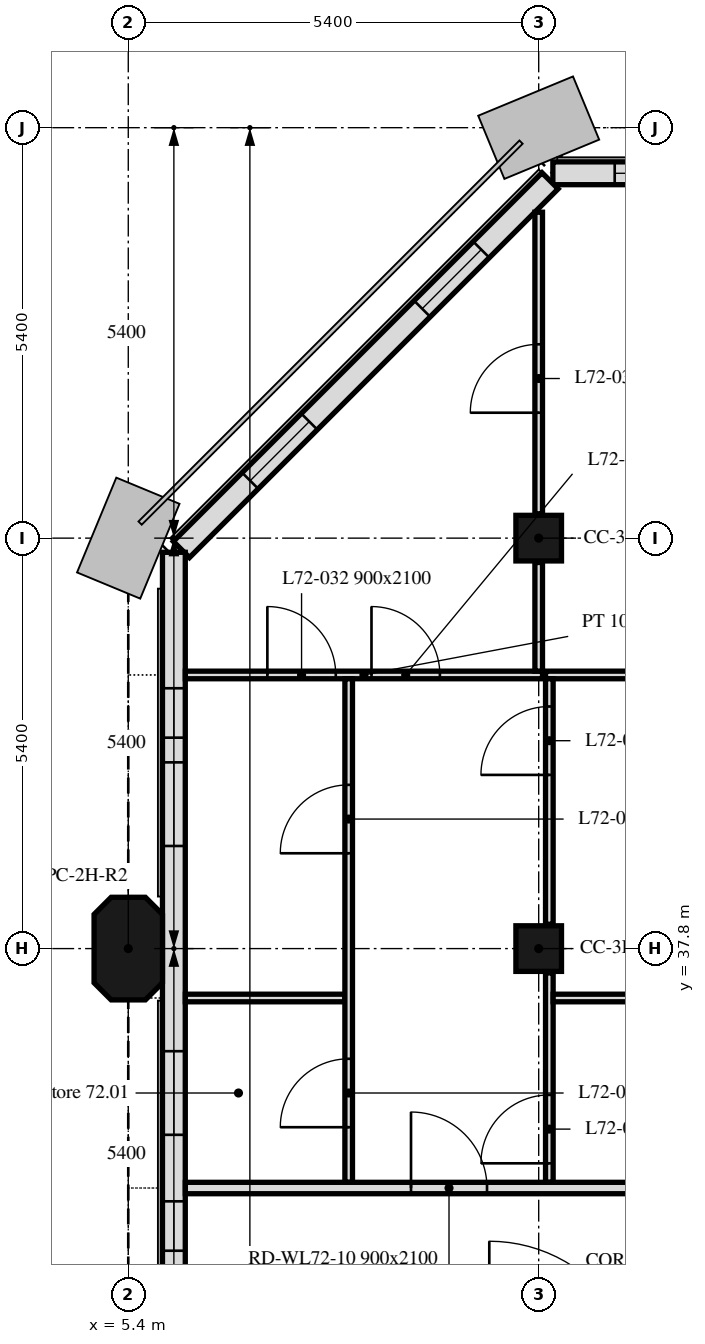
"""IFC4 building model, lengths in metres.
Left out: names, types, materials, properties, quantities, classifications, styles, units other than length and angle.
Written with IfcOpenShell. Run it as: python <this file> out.ifc"""

import sys

from ifc_helpers import new_model, si_unit, direction, frame, frame_2d, origin, origin_2d, place, context, subcontext, project, spatial, polyline, rectangle, outline, extrude, element, fill, save


model = new_model("IFC4")
c1 = context("Model", 3, precision=1e-05, world=origin(), true_north=direction((0.0, 1.0)))
c2 = subcontext(c1, "Body", "Model", "MODEL_VIEW")
j1 = project(units=[si_unit("LENGTHUNIT", "METRE"), si_unit("PLANEANGLEUNIT", "RADIAN")], contexts=[c1])
p1 = place(None, origin())
s1 = spatial("IfcSite", under=j1, at=p1, CompositionType="ELEMENT")
p2 = place(p1, origin())
s2 = spatial("IfcBuilding", under=s1, at=p2, CompositionType="ELEMENT")
p3 = place(p2, frame((0.0, 0.0, 291.7)))
s3 = spatial("IfcBuildingStorey", under=s2, at=p3, CompositionType="ELEMENT", Elevation=291.7)
p4 = place(p3, frame((5.4, 37.8, 0.0), z_axis=(0.0, 0.0, 1.0), x_axis=(0.0, 1.0, 0.0)))
e1 = element("IfcColumn", 1, at=p4, inside=s3, PredefinedType="COLUMN", context=c2, shape_type="SweptSolid", body=[
    extrude(outline(polyline([(-0.45, -0.45), (0.45, -0.45), (0.675, -0.225), (0.675, 0.225), (0.45, 0.45), (-0.45, 0.45), (-0.675, 0.225), (-0.675, -0.225), (-0.45, -0.45)])), origin(), (0.0, 0.0, 1.0), 3.0),
])
for number, where, z_axis, x_axis in (
    (2, (10.8, 37.8, 0.0), (0.0, 0.0, 1.0), (1.0, 0.0, 0.0)),
    (3, (10.8, 43.2, 0.0), (0.0, 0.0, 1.0), (1.0, 0.0, 0.0)),
):
    element("IfcColumn", number, at=place(p3, frame(where, z_axis=z_axis, x_axis=x_axis)), inside=s3, PredefinedType="COLUMN", context=c2, shape_type="SweptSolid", body=[
        extrude(rectangle(XDim=0.6, YDim=0.6, at=origin_2d()), origin(), (0.0, 0.0, 1.0), 3.0),
    ])
p5 = place(p3, frame((43.014, 48.0, 0.0), z_axis=(0.0, 0.0, 1.0), x_axis=(-1.0, 0.0, 0.0)))
e4 = element("IfcWall", 4, at=p5, inside=s3, PredefinedType="SOLIDWALL", context=c2, shape_type="SweptSolid", body=[
    extrude(rectangle(XDim=32.027, YDim=0.3, at=frame_2d((16.014, 0.0))), origin(), (0.0, 0.0, 1.0), 3.0),
])
p6 = place(p5, frame((2.764, 0.0, 0.9)))
e5 = element("IfcOpeningElement", 5, at=p6, cuts=e4, PredefinedType="OPENING", context=c2, shape_type="SweptSolid", body=[
    extrude(rectangle(XDim=1.1, YDim=1.7, at=frame_2d((0.55, 0.85))), frame((0.0, 0.16, 0.0), z_axis=(0.0, -1.0, 0.0), x_axis=(1.0, 0.0, 0.0)), (0.0, 0.0, 1.0), 0.32),
])
p7 = place(p5, frame((6.214, 0.0, 0.9)))
e6 = element("IfcOpeningElement", 6, at=p7, cuts=e4, PredefinedType="OPENING", context=c2, shape_type="SweptSolid", body=[
    extrude(rectangle(XDim=3.4, YDim=1.7, at=frame_2d((1.7, 0.85))), frame((0.0, 0.16, 0.0), z_axis=(0.0, -1.0, 0.0), x_axis=(1.0, 0.0, 0.0)), (0.0, 0.0, 1.0), 0.32),
])
p8 = place(p5, frame((13.564, 0.0, 0.9)))
e7 = element("IfcOpeningElement", 7, at=p8, cuts=e4, PredefinedType="OPENING", context=c2, shape_type="SweptSolid", body=[
    extrude(rectangle(XDim=1.1, YDim=1.7, at=frame_2d((0.55, 0.85))), frame((0.0, 0.16, 0.0), z_axis=(0.0, -1.0, 0.0), x_axis=(1.0, 0.0, 0.0)), (0.0, 0.0, 1.0), 0.32),
])
p9 = place(p5, frame((17.014, 0.0, 0.9)))
e8 = element("IfcOpeningElement", 8, at=p9, cuts=e4, PredefinedType="OPENING", context=c2, shape_type="SweptSolid", body=[
    extrude(rectangle(XDim=3.4, YDim=1.7, at=frame_2d((1.7, 0.85))), frame((0.0, 0.16, 0.0), z_axis=(0.0, -1.0, 0.0), x_axis=(1.0, 0.0, 0.0)), (0.0, 0.0, 1.0), 0.32),
])
p10 = place(p5, frame((24.364, 0.0, 0.9)))
e9 = element("IfcOpeningElement", 9, at=p10, cuts=e4, PredefinedType="OPENING", context=c2, shape_type="SweptSolid", body=[
    extrude(rectangle(XDim=1.1, YDim=1.7, at=frame_2d((0.55, 0.85))), frame((0.0, 0.16, 0.0), z_axis=(0.0, -1.0, 0.0), x_axis=(1.0, 0.0, 0.0)), (0.0, 0.0, 1.0), 0.32),
])
p11 = place(p5, frame((27.814, 0.0, 0.9)))
e10 = element("IfcOpeningElement", 10, at=p11, cuts=e4, PredefinedType="OPENING", context=c2, shape_type="SweptSolid", body=[
    extrude(rectangle(XDim=3.4, YDim=1.7, at=frame_2d((1.7, 0.85))), frame((0.0, 0.16, 0.0), z_axis=(0.0, -1.0, 0.0), x_axis=(1.0, 0.0, 0.0)), (0.0, 0.0, 1.0), 0.32),
])
p12 = place(p3, frame((10.949, 47.901, 0.0), z_axis=(0.0, 0.0, 1.0), x_axis=(-0.707106781187, -0.707106781187, 0.0)))
e11 = element("IfcWall", 11, at=p12, inside=s3, PredefinedType="SOLIDWALL", context=c2, shape_type="SweptSolid", body=[
    extrude(rectangle(XDim=6.86, YDim=0.3, at=frame_2d((3.43, 0.0))), origin(), (0.0, 0.0, 1.0), 3.0),
])
p13 = place(p12, frame((1.28, 0.0, 0.9)))
e12 = element("IfcOpeningElement", 12, at=p13, cuts=e11, PredefinedType="OPENING", context=c2, shape_type="SweptSolid", body=[
    extrude(rectangle(XDim=1.1, YDim=1.7, at=frame_2d((0.55, 0.85))), frame((0.0, 0.16, 0.0), z_axis=(0.0, -1.0, 0.0), x_axis=(1.0, 0.0, 0.0)), (0.0, 0.0, 1.0), 0.32),
])
p14 = place(p12, frame((4.48, 0.0, 0.9)))
e13 = element("IfcOpeningElement", 13, at=p14, cuts=e11, PredefinedType="OPENING", context=c2, shape_type="SweptSolid", body=[
    extrude(rectangle(XDim=1.1, YDim=1.7, at=frame_2d((0.55, 0.85))), frame((0.0, 0.16, 0.0), z_axis=(0.0, -1.0, 0.0), x_axis=(1.0, 0.0, 0.0)), (0.0, 0.0, 1.0), 0.32),
])
p15 = place(p3, frame((6.0, 43.014, 0.0), z_axis=(0.0, 0.0, 1.0), x_axis=(0.0, -1.0, 0.0)))
e14 = element("IfcWall", 14, at=p15, inside=s3, PredefinedType="SOLIDWALL", context=c2, shape_type="SweptSolid", body=[
    extrude(rectangle(XDim=10.614, YDim=0.3, at=frame_2d((5.307, 0.0))), origin(), (0.0, 0.0, 1.0), 3.0),
])
p16 = place(p15, frame((1.789, 0.0, 0.9)))
e15 = element("IfcOpeningElement", 15, at=p16, cuts=e14, PredefinedType="OPENING", context=c2, shape_type="SweptSolid", body=[
    extrude(rectangle(XDim=0.65, YDim=1.7, at=frame_2d((0.325, 0.85))), frame((0.0, 0.16, 0.0), z_axis=(0.0, -1.0, 0.0), x_axis=(1.0, 0.0, 0.0)), (0.0, 0.0, 1.0), 0.32),
])
p17 = place(p15, frame((2.764, 0.0, 0.9)))
e16 = element("IfcOpeningElement", 16, at=p17, cuts=e14, PredefinedType="OPENING", context=c2, shape_type="SweptSolid", body=[
    extrude(rectangle(XDim=1.1, YDim=1.7, at=frame_2d((0.55, 0.85))), frame((0.0, 0.16, 0.0), z_axis=(0.0, -1.0, 0.0), x_axis=(1.0, 0.0, 0.0)), (0.0, 0.0, 1.0), 0.32),
])
p18 = place(p15, frame((6.564, 0.0, 0.9)))
e17 = element("IfcOpeningElement", 17, at=p18, cuts=e14, PredefinedType="OPENING", context=c2, shape_type="SweptSolid", body=[
    extrude(rectangle(XDim=1.1, YDim=1.7, at=frame_2d((0.55, 0.85))), frame((0.0, 0.16, 0.0), z_axis=(0.0, -1.0, 0.0), x_axis=(1.0, 0.0, 0.0)), (0.0, 0.0, 1.0), 0.32),
])
p19 = place(p15, frame((8.539, 0.0, 0.9)))
e18 = element("IfcOpeningElement", 18, at=p19, cuts=e14, PredefinedType="OPENING", context=c2, shape_type="SweptSolid", body=[
    extrude(rectangle(XDim=0.65, YDim=1.7, at=frame_2d((0.325, 0.85))), frame((0.0, 0.16, 0.0), z_axis=(0.0, -1.0, 0.0), x_axis=(1.0, 0.0, 0.0)), (0.0, 0.0, 1.0), 0.32),
])
p20 = place(p3, frame((6.151, 41.4, 0.0), z_axis=(0.0, 0.0, 1.0), x_axis=(1.0, 0.0, 0.0)))
e19 = element("IfcWall", 19, at=p20, inside=s3, PredefinedType="PARTITIONING", context=c2, shape_type="SweptSolid", body=[
    extrude(rectangle(XDim=4.699, YDim=0.1, at=frame_2d((2.35, 0.0))), origin(), (0.0, 0.0, 1.0), 3.0),
])
p21 = place(p20, frame((1.079, 0.0, 0.0)))
e20 = element("IfcOpeningElement", 20, at=p21, cuts=e19, PredefinedType="OPENING", context=c2, shape_type="SweptSolid", body=[
    extrude(rectangle(XDim=0.9, YDim=2.1, at=frame_2d((0.45, 1.05))), frame((0.0, 0.05, 0.0), z_axis=(0.0, -1.0, 0.0), x_axis=(1.0, 0.0, 0.0)), (0.0, 0.0, 1.0), 0.1),
])
p22 = place(p20, frame((2.449, 0.0, 0.0)))
e21 = element("IfcOpeningElement", 21, at=p22, cuts=e19, PredefinedType="OPENING", context=c2, shape_type="SweptSolid", body=[
    extrude(rectangle(XDim=0.9, YDim=2.1, at=frame_2d((0.45, 1.05))), frame((0.0, 0.05, 0.0), z_axis=(0.0, -1.0, 0.0), x_axis=(1.0, 0.0, 0.0)), (0.0, 0.0, 1.0), 0.1),
])
p23 = place(p3, frame((10.8, 41.45, 0.0), z_axis=(0.0, 0.0, 1.0), x_axis=(0.0, 1.0, 0.0)))
e22 = element("IfcWall", 22, at=p23, inside=s3, PredefinedType="PARTITIONING", context=c2, shape_type="SweptSolid", body=[
    extrude(rectangle(XDim=1.43, YDim=0.1, at=frame_2d((0.715, 0.0))), origin(), (0.0, 0.0, 1.0), 3.0),
])
p24 = place(p3, frame((10.8, 43.52, 0.0), z_axis=(0.0, 0.0, 1.0), x_axis=(0.0, 1.0, 0.0)))
e23 = element("IfcWall", 23, at=p24, inside=s3, PredefinedType="PARTITIONING", context=c2, shape_type="SweptSolid", body=[
    extrude(rectangle(XDim=3.968, YDim=0.1, at=frame_2d((1.984, 0.0))), origin(), (0.0, 0.0, 1.0), 3.0),
])
p25 = place(p24, frame((1.33, 0.0, 0.0)))
e24 = element("IfcOpeningElement", 24, at=p25, cuts=e23, PredefinedType="OPENING", context=c2, shape_type="SweptSolid", body=[
    extrude(rectangle(XDim=0.9, YDim=2.1, at=frame_2d((0.45, 1.05))), frame((0.0, 0.05, 0.0), z_axis=(0.0, -1.0, 0.0), x_axis=(1.0, 0.0, 0.0)), (0.0, 0.0, 1.0), 0.1),
])
p26 = place(p3, frame((10.89, 41.4, 0.0), z_axis=(0.0, 0.0, 1.0), x_axis=(1.0, 0.0, 0.0)))
e25 = element("IfcWall", 25, at=p26, inside=s3, PredefinedType="PARTITIONING", context=c2, shape_type="SweptSolid", body=[
    extrude(rectangle(XDim=5.235, YDim=0.1, at=frame_2d((2.618, 0.0))), origin(), (0.0, 0.0, 1.0), 3.0),
])
p27 = place(p26, frame((3.15, 0.0, 0.0)))
e26 = element("IfcOpeningElement", 26, at=p27, cuts=e25, PredefinedType="OPENING", context=c2, shape_type="SweptSolid", body=[
    extrude(rectangle(XDim=0.9, YDim=2.1, at=frame_2d((0.45, 1.05))), frame((0.0, 0.05, 0.0), z_axis=(0.0, -1.0, 0.0), x_axis=(1.0, 0.0, 0.0)), (0.0, 0.0, 1.0), 0.1),
])
p28 = place(p3, frame((6.151, 37.15, 0.0), z_axis=(0.0, 0.0, 1.0), x_axis=(1.0, 0.0, 0.0)))
e27 = element("IfcWall", 27, at=p28, inside=s3, PredefinedType="PARTITIONING", context=c2, shape_type="SweptSolid", body=[
    extrude(rectangle(XDim=2.099, YDim=0.1, at=frame_2d((1.05, 0.0))), origin(), (0.0, 0.0, 1.0), 3.0),
])
p29 = place(p3, frame((8.3, 34.725, 0.0), z_axis=(0.0, 0.0, 1.0), x_axis=(0.0, 1.0, 0.0)))
e28 = element("IfcWall", 28, at=p29, inside=s3, PredefinedType="PARTITIONING", context=c2, shape_type="SweptSolid", body=[
    extrude(rectangle(XDim=6.625, YDim=0.1, at=frame_2d((3.312, 0.0))), origin(), (0.0, 0.0, 1.0), 3.0),
])
p30 = place(p29, frame((0.725, 0.0, 0.0)))
e29 = element("IfcOpeningElement", 29, at=p30, cuts=e28, PredefinedType="OPENING", context=c2, shape_type="SweptSolid", body=[
    extrude(rectangle(XDim=0.9, YDim=2.1, at=frame_2d((0.45, 1.05))), frame((0.0, 0.05, 0.0), z_axis=(0.0, -1.0, 0.0), x_axis=(1.0, 0.0, 0.0)), (0.0, 0.0, 1.0), 0.1),
])
p31 = place(p29, frame((4.329, 0.0, 0.0)))
e30 = element("IfcOpeningElement", 30, at=p31, cuts=e28, PredefinedType="OPENING", context=c2, shape_type="SweptSolid", body=[
    extrude(rectangle(XDim=0.9, YDim=2.1, at=frame_2d((0.45, 1.05))), frame((0.0, 0.05, 0.0), z_axis=(0.0, -1.0, 0.0), x_axis=(1.0, 0.0, 0.0)), (0.0, 0.0, 1.0), 0.1),
])
p32 = place(p3, frame((10.94, 34.725, 0.0), z_axis=(0.0, 0.0, 1.0), x_axis=(0.0, 1.0, 0.0)))
e31 = element("IfcWall", 31, at=p32, inside=s3, PredefinedType="PARTITIONING", context=c2, shape_type="SweptSolid", body=[
    extrude(rectangle(XDim=2.755, YDim=0.1, at=frame_2d((1.377, 0.0))), origin(), (0.0, 0.0, 1.0), 3.0),
])
p33 = place(p32, frame((0.25, 0.0, 0.0)))
e32 = element("IfcOpeningElement", 32, at=p33, cuts=e31, PredefinedType="OPENING", context=c2, shape_type="SweptSolid", body=[
    extrude(rectangle(XDim=0.9, YDim=2.1, at=frame_2d((0.45, 1.05))), frame((0.0, 0.05, 0.0), z_axis=(0.0, -1.0, 0.0), x_axis=(1.0, 0.0, 0.0)), (0.0, 0.0, 1.0), 0.1),
])
p34 = place(p3, frame((10.94, 38.12, 0.0), z_axis=(0.0, 0.0, 1.0), x_axis=(0.0, 1.0, 0.0)))
e33 = element("IfcWall", 33, at=p34, inside=s3, PredefinedType="PARTITIONING", context=c2, shape_type="SweptSolid", body=[
    extrude(rectangle(XDim=3.23, YDim=0.1, at=frame_2d((1.615, 0.0))), origin(), (0.0, 0.0, 1.0), 3.0),
])
p35 = place(p34, frame((1.965, 0.0, 0.0)))
e34 = element("IfcOpeningElement", 34, at=p35, cuts=e33, PredefinedType="OPENING", context=c2, shape_type="SweptSolid", body=[
    extrude(rectangle(XDim=0.9, YDim=2.1, at=frame_2d((0.45, 1.05))), frame((0.0, 0.05, 0.0), z_axis=(0.0, -1.0, 0.0), x_axis=(1.0, 0.0, 0.0)), (0.0, 0.0, 1.0), 0.1),
])
p36 = place(p3, frame((10.99, 37.15, 0.0), z_axis=(0.0, 0.0, 1.0), x_axis=(1.0, 0.0, 0.0)))
e35 = element("IfcWall", 35, at=p36, inside=s3, PredefinedType="PARTITIONING", context=c2, shape_type="SweptSolid", body=[
    extrude(rectangle(XDim=5.135, YDim=0.1, at=frame_2d((2.567, 0.0))), origin(), (0.0, 0.0, 1.0), 3.0),
])
p37 = place(p36, frame((3.12, 0.0, 0.0)))
e36 = element("IfcOpeningElement", 36, at=p37, cuts=e35, PredefinedType="OPENING", context=c2, shape_type="SweptSolid", body=[
    extrude(rectangle(XDim=0.9, YDim=2.1, at=frame_2d((0.45, 1.05))), frame((0.0, 0.05, 0.0), z_axis=(0.0, -1.0, 0.0), x_axis=(1.0, 0.0, 0.0)), (0.0, 0.0, 1.0), 0.1),
])
p38 = place(p3, frame((6.151, 34.65, 0.0), z_axis=(0.0, 0.0, 1.0), x_axis=(1.0, 0.0, 0.0)))
e37 = element("IfcWall", 37, at=p38, inside=s3, PredefinedType="PARTITIONING", context=c2, shape_type="SweptSolid", body=[
    extrude(rectangle(XDim=41.698, YDim=0.15, at=frame_2d((20.849, 0.0))), origin(), (0.0, 0.0, 1.0), 2.4),
])
p39 = place(p38, frame((2.969, 0.0, 0.0)))
e38 = element("IfcOpeningElement", 38, at=p39, cuts=e37, PredefinedType="OPENING", context=c2, shape_type="SweptSolid", body=[
    extrude(rectangle(XDim=1.0, YDim=2.1, at=frame_2d((0.5, 1.05))), frame((0.0, 0.075, 0.0), z_axis=(0.0, -1.0, 0.0), x_axis=(1.0, 0.0, 0.0)), (0.0, 0.0, 1.0), 0.15),
])
p40 = place(p38, frame((12.944, 0.0, 0.0)))
e39 = element("IfcOpeningElement", 39, at=p40, cuts=e37, PredefinedType="OPENING", context=c2, shape_type="SweptSolid", body=[
    extrude(rectangle(XDim=1.0, YDim=2.1, at=frame_2d((0.5, 1.05))), frame((0.0, 0.075, 0.0), z_axis=(0.0, -1.0, 0.0), x_axis=(1.0, 0.0, 0.0)), (0.0, 0.0, 1.0), 0.15),
])
p41 = place(p38, frame((24.444, 0.0, 0.0)))
e40 = element("IfcOpeningElement", 40, at=p41, cuts=e37, PredefinedType="OPENING", context=c2, shape_type="SweptSolid", body=[
    extrude(rectangle(XDim=1.0, YDim=2.1, at=frame_2d((0.5, 1.05))), frame((0.0, 0.075, 0.0), z_axis=(0.0, -1.0, 0.0), x_axis=(1.0, 0.0, 0.0)), (0.0, 0.0, 1.0), 0.15),
])
p42 = place(p38, frame((34.964, 0.0, 0.0)))
e41 = element("IfcOpeningElement", 41, at=p42, cuts=e37, PredefinedType="OPENING", context=c2, shape_type="SweptSolid", body=[
    extrude(rectangle(XDim=1.0, YDim=2.1, at=frame_2d((0.5, 1.05))), frame((0.0, 0.075, 0.0), z_axis=(0.0, -1.0, 0.0), x_axis=(1.0, 0.0, 0.0)), (0.0, 0.0, 1.0), 0.15),
])
p43 = place(p11, origin())
e42 = element("IfcWindow", 42, at=p43, inside=s3, PartitioningType="SINGLE_PANEL", PredefinedType="WINDOW", context=c2, shape_type="SweptSolid", body=[
    extrude(rectangle(XDim=3.4, YDim=1.7, at=frame_2d((1.7, 0.85))), frame((0.0, 0.03, 0.0), z_axis=(0.0, -1.0, 0.0), x_axis=(1.0, 0.0, 0.0)), (0.0, 0.0, 1.0), 0.06),
])
fill(e10, e42)
p44 = place(p13, origin())
e43 = element("IfcWindow", 43, at=p44, inside=s3, PartitioningType="SINGLE_PANEL", PredefinedType="WINDOW", context=c2, shape_type="SweptSolid", body=[
    extrude(rectangle(XDim=1.1, YDim=1.7, at=frame_2d((0.55, 0.85))), frame((0.0, 0.03, 0.0), z_axis=(0.0, -1.0, 0.0), x_axis=(1.0, 0.0, 0.0)), (0.0, 0.0, 1.0), 0.06),
])
fill(e12, e43)
p45 = place(p14, origin())
e44 = element("IfcWindow", 44, at=p45, inside=s3, PartitioningType="SINGLE_PANEL", PredefinedType="WINDOW", context=c2, shape_type="SweptSolid", body=[
    extrude(rectangle(XDim=1.1, YDim=1.7, at=frame_2d((0.55, 0.85))), frame((0.0, 0.03, 0.0), z_axis=(0.0, -1.0, 0.0), x_axis=(1.0, 0.0, 0.0)), (0.0, 0.0, 1.0), 0.06),
])
fill(e13, e44)
p46 = place(p16, origin())
e45 = element("IfcWindow", 45, at=p46, inside=s3, PartitioningType="SINGLE_PANEL", PredefinedType="WINDOW", context=c2, shape_type="SweptSolid", body=[
    extrude(rectangle(XDim=0.65, YDim=1.7, at=frame_2d((0.325, 0.85))), frame((0.0, 0.03, 0.0), z_axis=(0.0, -1.0, 0.0), x_axis=(1.0, 0.0, 0.0)), (0.0, 0.0, 1.0), 0.06),
])
fill(e15, e45)
p47 = place(p17, origin())
e46 = element("IfcWindow", 46, at=p47, inside=s3, PartitioningType="SINGLE_PANEL", PredefinedType="WINDOW", context=c2, shape_type="SweptSolid", body=[
    extrude(rectangle(XDim=1.1, YDim=1.7, at=frame_2d((0.55, 0.85))), frame((0.0, 0.03, 0.0), z_axis=(0.0, -1.0, 0.0), x_axis=(1.0, 0.0, 0.0)), (0.0, 0.0, 1.0), 0.06),
])
fill(e16, e46)
p48 = place(p18, origin())
e47 = element("IfcWindow", 47, at=p48, inside=s3, PartitioningType="SINGLE_PANEL", PredefinedType="WINDOW", context=c2, shape_type="SweptSolid", body=[
    extrude(rectangle(XDim=1.1, YDim=1.7, at=frame_2d((0.55, 0.85))), frame((0.0, 0.03, 0.0), z_axis=(0.0, -1.0, 0.0), x_axis=(1.0, 0.0, 0.0)), (0.0, 0.0, 1.0), 0.06),
])
fill(e17, e47)
p49 = place(p19, origin())
e48 = element("IfcWindow", 48, at=p49, inside=s3, PartitioningType="SINGLE_PANEL", PredefinedType="WINDOW", context=c2, shape_type="SweptSolid", body=[
    extrude(rectangle(XDim=0.65, YDim=1.7, at=frame_2d((0.325, 0.85))), frame((0.0, 0.03, 0.0), z_axis=(0.0, -1.0, 0.0), x_axis=(1.0, 0.0, 0.0)), (0.0, 0.0, 1.0), 0.06),
])
fill(e18, e48)
p50 = place(p30, origin())
e49 = element("IfcDoor", 49, at=p50, inside=s3, OperationType="SINGLE_SWING_LEFT", PredefinedType="DOOR", context=c2, shape_type="SweptSolid", body=[
    extrude(rectangle(XDim=0.9, YDim=2.1, at=frame_2d((0.45, 1.05))), frame((0.0, 0.025, 0.0), z_axis=(0.0, -1.0, 0.0), x_axis=(1.0, 0.0, 0.0)), (0.0, 0.0, 1.0), 0.05),
])
fill(e29, e49)
p51 = place(p35, origin())
e50 = element("IfcDoor", 50, at=p51, inside=s3, OperationType="SINGLE_SWING_RIGHT", PredefinedType="DOOR", context=c2, shape_type="SweptSolid", body=[
    extrude(rectangle(XDim=0.9, YDim=2.1, at=frame_2d((0.45, 1.05))), frame((0.0, 0.025, 0.0), z_axis=(0.0, -1.0, 0.0), x_axis=(1.0, 0.0, 0.0)), (0.0, 0.0, 1.0), 0.05),
])
fill(e34, e50)
p52 = place(p33, origin())
e51 = element("IfcDoor", 51, at=p52, inside=s3, OperationType="SINGLE_SWING_RIGHT", PredefinedType="DOOR", context=c2, shape_type="SweptSolid", body=[
    extrude(rectangle(XDim=0.9, YDim=2.1, at=frame_2d((0.45, 1.05))), frame((0.0, 0.025, 0.0), z_axis=(0.0, -1.0, 0.0), x_axis=(1.0, 0.0, 0.0)), (0.0, 0.0, 1.0), 0.05),
])
fill(e32, e51)
p53 = place(p25, origin())
e52 = element("IfcDoor", 52, at=p53, inside=s3, OperationType="SINGLE_SWING_LEFT", PredefinedType="DOOR", context=c2, shape_type="SweptSolid", body=[
    extrude(rectangle(XDim=0.9, YDim=2.1, at=frame_2d((0.45, 1.05))), frame((0.0, 0.025, 0.0), z_axis=(0.0, -1.0, 0.0), x_axis=(1.0, 0.0, 0.0)), (0.0, 0.0, 1.0), 0.05),
])
fill(e24, e52)
p54 = place(p21, origin())
e53 = element("IfcDoor", 53, at=p54, inside=s3, OperationType="SINGLE_SWING_LEFT", PredefinedType="DOOR", context=c2, shape_type="SweptSolid", body=[
    extrude(rectangle(XDim=0.9, YDim=2.1, at=frame_2d((0.45, 1.05))), frame((0.0, 0.025, 0.0), z_axis=(0.0, -1.0, 0.0), x_axis=(1.0, 0.0, 0.0)), (0.0, 0.0, 1.0), 0.05),
])
fill(e20, e53)
p55 = place(p31, origin())
e54 = element("IfcDoor", 54, at=p55, inside=s3, OperationType="SINGLE_SWING_RIGHT", PredefinedType="DOOR", context=c2, shape_type="SweptSolid", body=[
    extrude(rectangle(XDim=0.9, YDim=2.1, at=frame_2d((0.45, 1.05))), frame((0.0, 0.025, 0.0), z_axis=(0.0, -1.0, 0.0), x_axis=(1.0, 0.0, 0.0)), (0.0, 0.0, 1.0), 0.05),
])
fill(e30, e54)
p56 = place(p22, origin())
e55 = element("IfcDoor", 55, at=p56, inside=s3, OperationType="SINGLE_SWING_RIGHT", PredefinedType="DOOR", context=c2, shape_type="SweptSolid", body=[
    extrude(rectangle(XDim=0.9, YDim=2.1, at=frame_2d((0.45, 1.05))), frame((0.0, 0.025, 0.0), z_axis=(0.0, -1.0, 0.0), x_axis=(1.0, 0.0, 0.0)), (0.0, 0.0, 1.0), 0.05),
])
fill(e21, e55)
p57 = place(p39, origin())
e56 = element("IfcDoor", 56, at=p57, inside=s3, OperationType="SINGLE_SWING_RIGHT", PredefinedType="DOOR", context=c2, shape_type="SweptSolid", body=[
    extrude(rectangle(XDim=1.0, YDim=2.1, at=frame_2d((0.5, 1.05))), frame((0.0, 0.025, 0.0), z_axis=(0.0, -1.0, 0.0), x_axis=(1.0, 0.0, 0.0)), (0.0, 0.0, 1.0), 0.05),
])
fill(e38, e56)
save(model, sys.argv[1])
